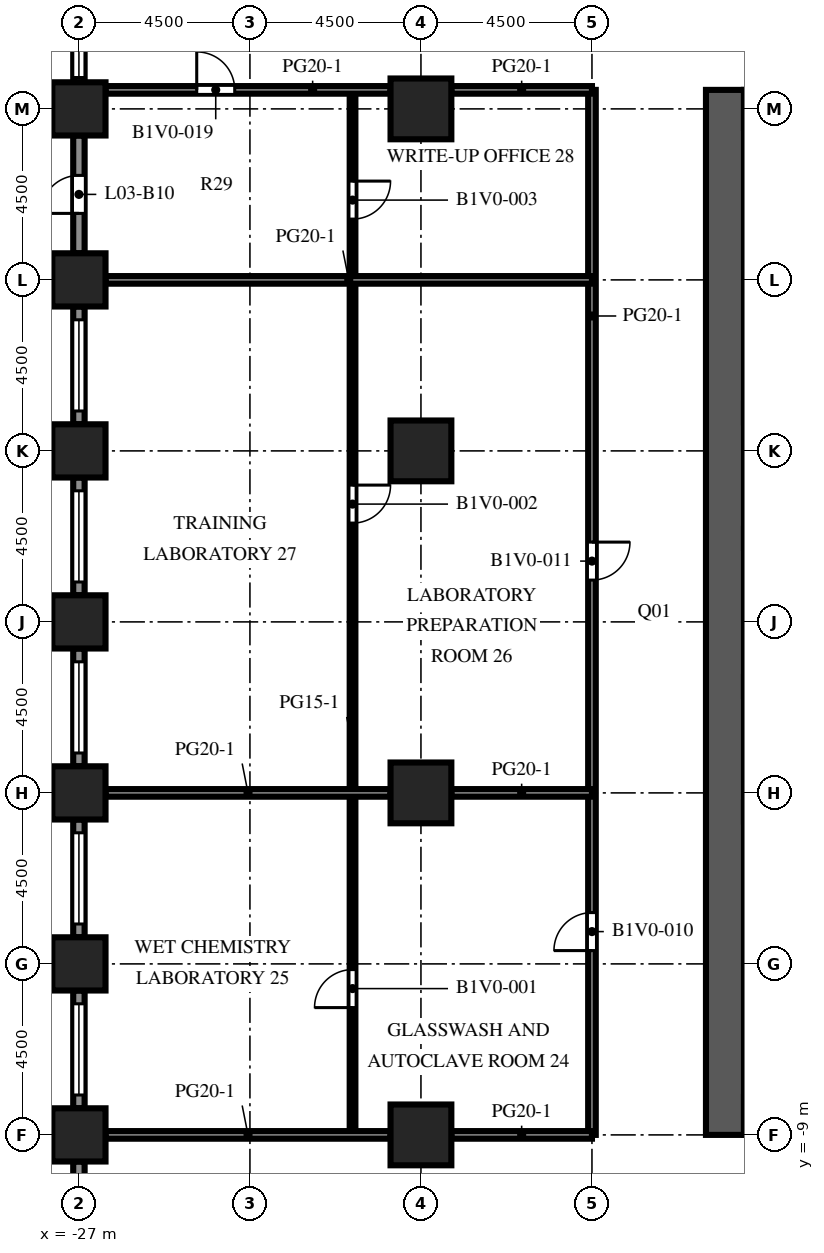
"""IFC4 building model, lengths in metres.
Left out: names, types, materials, properties, quantities, classifications, styles, units other than length and angle.
Written with IfcOpenShell. Run it as: python <this file> out.ifc"""

import sys

from ifc_helpers import new_model, si_unit, direction, frame, frame_2d, origin, origin_2d, place, context, subcontext, project, spatial, rectangle, extrude, element, fill, save


model = new_model("IFC4")
c1 = context("Model", 3, precision=1e-05, world=origin(), true_north=direction((0.0, 1.0)))
c2 = subcontext(c1, "Body", "Model", "MODEL_VIEW")
j1 = project(units=[si_unit("LENGTHUNIT", "METRE"), si_unit("PLANEANGLEUNIT", "RADIAN")], contexts=[c1])
p1 = place(None, origin())
s1 = spatial("IfcSite", under=j1, at=p1, CompositionType="ELEMENT")
p2 = place(p1, origin())
s2 = spatial("IfcBuilding", under=s1, at=p2, CompositionType="ELEMENT")
p3 = place(p2, frame((0.0, 0.0, 15.4)))
s3 = spatial("IfcBuildingStorey", under=s2, at=p3, CompositionType="ELEMENT", Elevation=15.4)
for number, where, z_axis, x_axis in (
    (1, (-27.0, -9.0, 0.0), (0.0, 0.0, 1.0), (1.0, 0.0, 0.0)),
    (2, (-27.0, -4.5, 0.0), (0.0, 0.0, 1.0), (1.0, 0.0, 0.0)),
    (3, (-27.0, 0.0, 0.0), (0.0, 0.0, 1.0), (1.0, 0.0, 0.0)),
    (4, (-27.0, 4.5, 0.0), (0.0, 0.0, 1.0), (1.0, 0.0, 0.0)),
    (5, (-27.0, 9.0, 0.0), (0.0, 0.0, 1.0), (1.0, 0.0, 0.0)),
    (6, (-27.0, 13.5, 0.0), (0.0, 0.0, 1.0), (1.0, 0.0, 0.0)),
    (7, (-27.0, 18.0, 0.0), (0.0, 0.0, 1.0), (1.0, 0.0, 0.0)),
):
    element("IfcColumn", number, at=place(p3, frame(where, z_axis=z_axis, x_axis=x_axis)), inside=s3, PredefinedType="COLUMN", context=c2, shape_type="SweptSolid", body=[
        extrude(rectangle(XDim=1.4, YDim=1.4, at=origin_2d()), origin(), (0.0, 0.0, 1.0), 4.1),
    ])
for number, where, z_axis, x_axis in (
    (8, (-18.0, -9.0, 0.0), (0.0, 0.0, 1.0), (1.0, 0.0, 0.0)),
    (9, (-18.0, 0.0, 0.0), (0.0, 0.0, 1.0), (1.0, 0.0, 0.0)),
    (10, (-18.0, 9.0, 0.0), (0.0, 0.0, 1.0), (1.0, 0.0, 0.0)),
    (11, (-18.0, 18.0, 0.0), (0.0, 0.0, 1.0), (1.0, 0.0, 0.0)),
):
    element("IfcColumn", number, at=place(p3, frame(where, z_axis=z_axis, x_axis=x_axis)), inside=s3, PredefinedType="COLUMN", context=c2, shape_type="SweptSolid", body=[
        extrude(rectangle(XDim=1.6, YDim=1.6, at=origin_2d()), origin(), (0.0, 0.0, 1.0), 4.1),
    ])
p4 = place(p3, frame((-10.0, -9.0, 0.0), z_axis=(0.0, 0.0, 1.0), x_axis=(0.0, 1.0, 0.0)))
e12 = element("IfcWall", 12, at=p4, inside=s3, PredefinedType="SHEAR", context=c2, shape_type="SweptSolid", body=[
    extrude(rectangle(XDim=27.5, YDim=1.0, at=frame_2d((13.75, 0.0))), origin(), (0.0, 0.0, 1.0), 4.1),
])
p5 = place(p4, frame((12.55, 0.0, 0.0)))
e13 = element("IfcOpeningElement", 13, at=p5, cuts=e12, PredefinedType="OPENING", context=c2, shape_type="SweptSolid", body=[
    extrude(rectangle(XDim=2.4, YDim=2.4, at=frame_2d((1.2, 1.2))), frame((0.0, 0.51, 0.0), z_axis=(0.0, -1.0, 0.0), x_axis=(1.0, 0.0, 0.0)), (0.0, 0.0, 1.0), 1.02),
])
p6 = place(p4, frame((6.825, 0.0, 0.0)))
e14 = element("IfcOpeningElement", 14, at=p6, cuts=e12, PredefinedType="OPENING", context=c2, shape_type="SweptSolid", body=[
    extrude(rectangle(XDim=1.2, YDim=2.1, at=frame_2d((0.6, 1.05))), frame((0.0, 0.51, 0.0), z_axis=(0.0, -1.0, 0.0), x_axis=(1.0, 0.0, 0.0)), (0.0, 0.0, 1.0), 1.02),
])
p7 = place(p4, frame((19.475, 0.0, 0.0)))
e15 = element("IfcOpeningElement", 15, at=p7, cuts=e12, PredefinedType="OPENING", context=c2, shape_type="SweptSolid", body=[
    extrude(rectangle(XDim=1.2, YDim=2.1, at=frame_2d((0.6, 1.05))), frame((0.0, 0.51, 0.0), z_axis=(0.0, -1.0, 0.0), x_axis=(1.0, 0.0, 0.0)), (0.0, 0.0, 1.0), 1.02),
])
p8 = place(p3, frame((-27.0, 18.7, 0.0), z_axis=(0.0, 0.0, 1.0), x_axis=(0.0, 1.0, 0.0)))
e16 = element("IfcWall", 16, at=p8, inside=s3, PredefinedType="SOLIDWALL", context=c2, shape_type="SweptSolid", body=[
    extrude(rectangle(XDim=3.1, YDim=0.3, at=frame_2d((1.55, 0.0))), origin(), (0.0, 0.0, 1.0), 2.75),
])
p9 = place(p8, frame((0.125, 0.0, 0.8)))
e17 = element("IfcOpeningElement", 17, at=p9, cuts=e16, PredefinedType="OPENING", context=c2, shape_type="SweptSolid", body=[
    extrude(rectangle(XDim=2.4, YDim=1.7, at=frame_2d((1.2, 0.85))), frame((0.0, 0.16, 0.0), z_axis=(0.0, -1.0, 0.0), x_axis=(1.0, 0.0, 0.0)), (0.0, 0.0, 1.0), 0.32),
])
p10 = place(p3, frame((-27.0, 14.2, 0.0), z_axis=(0.0, 0.0, 1.0), x_axis=(0.0, 1.0, 0.0)))
e18 = element("IfcWall", 18, at=p10, inside=s3, PredefinedType="SOLIDWALL", context=c2, shape_type="SweptSolid", body=[
    extrude(rectangle(XDim=3.1, YDim=0.3, at=frame_2d((1.55, 0.0))), origin(), (0.0, 0.0, 1.0), 2.75),
])
p11 = place(p10, frame((1.05, 0.0, 0.0)))
e19 = element("IfcOpeningElement", 19, at=p11, cuts=e18, PredefinedType="OPENING", context=c2, shape_type="SweptSolid", body=[
    extrude(rectangle(XDim=1.0, YDim=2.2, at=frame_2d((0.5, 1.1))), frame((0.0, 0.16, 0.0), z_axis=(0.0, -1.0, 0.0), x_axis=(1.0, 0.0, 0.0)), (0.0, 0.0, 1.0), 0.32),
])
p12 = place(p3, frame((-27.0, 9.7, 0.0), z_axis=(0.0, 0.0, 1.0), x_axis=(0.0, 1.0, 0.0)))
e20 = element("IfcWall", 20, at=p12, inside=s3, PredefinedType="SOLIDWALL", context=c2, shape_type="SweptSolid", body=[
    extrude(rectangle(XDim=3.1, YDim=0.3, at=frame_2d((1.55, 0.0))), origin(), (0.0, 0.0, 1.0), 2.75),
])
p13 = place(p12, frame((0.35, 0.0, 0.8)))
e21 = element("IfcOpeningElement", 21, at=p13, cuts=e20, PredefinedType="OPENING", context=c2, shape_type="SweptSolid", body=[
    extrude(rectangle(XDim=2.4, YDim=1.7, at=frame_2d((1.2, 0.85))), frame((0.0, 0.16, 0.0), z_axis=(0.0, -1.0, 0.0), x_axis=(1.0, 0.0, 0.0)), (0.0, 0.0, 1.0), 0.32),
])
p14 = place(p3, frame((-27.0, 5.2, 0.0), z_axis=(0.0, 0.0, 1.0), x_axis=(0.0, 1.0, 0.0)))
e22 = element("IfcWall", 22, at=p14, inside=s3, PredefinedType="SOLIDWALL", context=c2, shape_type="SweptSolid", body=[
    extrude(rectangle(XDim=3.1, YDim=0.3, at=frame_2d((1.55, 0.0))), origin(), (0.0, 0.0, 1.0), 2.75),
])
p15 = place(p14, frame((0.35, 0.0, 0.8)))
e23 = element("IfcOpeningElement", 23, at=p15, cuts=e22, PredefinedType="OPENING", context=c2, shape_type="SweptSolid", body=[
    extrude(rectangle(XDim=2.4, YDim=1.7, at=frame_2d((1.2, 0.85))), frame((0.0, 0.16, 0.0), z_axis=(0.0, -1.0, 0.0), x_axis=(1.0, 0.0, 0.0)), (0.0, 0.0, 1.0), 0.32),
])
p16 = place(p3, frame((-27.0, 0.7, 0.0), z_axis=(0.0, 0.0, 1.0), x_axis=(0.0, 1.0, 0.0)))
e24 = element("IfcWall", 24, at=p16, inside=s3, PredefinedType="SOLIDWALL", context=c2, shape_type="SweptSolid", body=[
    extrude(rectangle(XDim=3.1, YDim=0.3, at=frame_2d((1.55, 0.0))), origin(), (0.0, 0.0, 1.0), 2.75),
])
p17 = place(p16, frame((0.35, 0.0, 0.8)))
e25 = element("IfcOpeningElement", 25, at=p17, cuts=e24, PredefinedType="OPENING", context=c2, shape_type="SweptSolid", body=[
    extrude(rectangle(XDim=2.4, YDim=1.7, at=frame_2d((1.2, 0.85))), frame((0.0, 0.16, 0.0), z_axis=(0.0, -1.0, 0.0), x_axis=(1.0, 0.0, 0.0)), (0.0, 0.0, 1.0), 0.32),
])
p18 = place(p3, frame((-27.0, -3.8, 0.0), z_axis=(0.0, 0.0, 1.0), x_axis=(0.0, 1.0, 0.0)))
e26 = element("IfcWall", 26, at=p18, inside=s3, PredefinedType="SOLIDWALL", context=c2, shape_type="SweptSolid", body=[
    extrude(rectangle(XDim=3.1, YDim=0.3, at=frame_2d((1.55, 0.0))), origin(), (0.0, 0.0, 1.0), 2.75),
])
p19 = place(p18, frame((0.35, 0.0, 0.8)))
e27 = element("IfcOpeningElement", 27, at=p19, cuts=e26, PredefinedType="OPENING", context=c2, shape_type="SweptSolid", body=[
    extrude(rectangle(XDim=2.4, YDim=1.7, at=frame_2d((1.2, 0.85))), frame((0.0, 0.16, 0.0), z_axis=(0.0, -1.0, 0.0), x_axis=(1.0, 0.0, 0.0)), (0.0, 0.0, 1.0), 0.32),
])
p20 = place(p3, frame((-27.0, -8.3, 0.0), z_axis=(0.0, 0.0, 1.0), x_axis=(0.0, 1.0, 0.0)))
e28 = element("IfcWall", 28, at=p20, inside=s3, PredefinedType="SOLIDWALL", context=c2, shape_type="SweptSolid", body=[
    extrude(rectangle(XDim=3.1, YDim=0.3, at=frame_2d((1.55, 0.0))), origin(), (0.0, 0.0, 1.0), 2.75),
])
p21 = place(p20, frame((0.35, 0.0, 0.8)))
e29 = element("IfcOpeningElement", 29, at=p21, cuts=e28, PredefinedType="OPENING", context=c2, shape_type="SweptSolid", body=[
    extrude(rectangle(XDim=2.4, YDim=1.7, at=frame_2d((1.2, 0.85))), frame((0.0, 0.16, 0.0), z_axis=(0.0, -1.0, 0.0), x_axis=(1.0, 0.0, 0.0)), (0.0, 0.0, 1.0), 0.32),
])
p22 = place(p3, frame((-27.0, -12.8, 0.0), z_axis=(0.0, 0.0, 1.0), x_axis=(0.0, 1.0, 0.0)))
e30 = element("IfcWall", 30, at=p22, inside=s3, PredefinedType="SOLIDWALL", context=c2, shape_type="SweptSolid", body=[
    extrude(rectangle(XDim=3.1, YDim=0.3, at=frame_2d((1.55, 0.0))), origin(), (0.0, 0.0, 1.0), 2.75),
])
p23 = place(p22, frame((1.425, 0.0, 0.8)))
e31 = element("IfcOpeningElement", 31, at=p23, cuts=e30, PredefinedType="OPENING", context=c2, shape_type="SweptSolid", body=[
    extrude(rectangle(XDim=1.2, YDim=1.7, at=frame_2d((0.6, 0.85))), frame((0.0, 0.16, 0.0), z_axis=(0.0, -1.0, 0.0), x_axis=(1.0, 0.0, 0.0)), (0.0, 0.0, 1.0), 0.32),
])
p24 = place(p3, frame((-19.8, -9.0, 0.0), z_axis=(0.0, 0.0, 1.0), x_axis=(0.0, 1.0, 0.0)))
e32 = element("IfcWall", 32, at=p24, inside=s3, PredefinedType="PARTITIONING", context=c2, shape_type="SweptSolid", body=[
    extrude(rectangle(XDim=27.5, YDim=0.15, at=frame_2d((13.75, 0.0))), origin(), (0.0, 0.0, 1.0), 3.65),
])
p25 = place(p24, frame((3.35, 0.0, 0.0)))
e33 = element("IfcOpeningElement", 33, at=p25, cuts=e32, PredefinedType="OPENING", context=c2, shape_type="SweptSolid", body=[
    extrude(rectangle(XDim=1.0, YDim=2.1, at=frame_2d((0.5, 1.05))), frame((0.0, 0.085, 0.0), z_axis=(0.0, -1.0, 0.0), x_axis=(1.0, 0.0, 0.0)), (0.0, 0.0, 1.0), 0.17),
])
p26 = place(p24, frame((16.1, 0.0, 0.0)))
e34 = element("IfcOpeningElement", 34, at=p26, cuts=e32, PredefinedType="OPENING", context=c2, shape_type="SweptSolid", body=[
    extrude(rectangle(XDim=1.0, YDim=2.1, at=frame_2d((0.5, 1.05))), frame((0.0, 0.085, 0.0), z_axis=(0.0, -1.0, 0.0), x_axis=(1.0, 0.0, 0.0)), (0.0, 0.0, 1.0), 0.17),
])
p27 = place(p24, frame((24.1, 0.0, 0.0)))
e35 = element("IfcOpeningElement", 35, at=p27, cuts=e32, PredefinedType="OPENING", context=c2, shape_type="SweptSolid", body=[
    extrude(rectangle(XDim=1.0, YDim=2.1, at=frame_2d((0.5, 1.05))), frame((0.0, 0.085, 0.0), z_axis=(0.0, -1.0, 0.0), x_axis=(1.0, 0.0, 0.0)), (0.0, 0.0, 1.0), 0.17),
])
p28 = place(p3, frame((-13.5, -9.0, 0.0), z_axis=(0.0, 0.0, 1.0), x_axis=(0.0, 1.0, 0.0)))
e36 = element("IfcWall", 36, at=p28, inside=s3, PredefinedType="PARTITIONING", context=c2, shape_type="SweptSolid", body=[
    extrude(rectangle(XDim=27.5, YDim=0.2, at=frame_2d((13.75, 0.0))), origin(), (0.0, 0.0, 1.0), 3.65),
])
p29 = place(p28, frame((4.85, 0.0, 0.0)))
e37 = element("IfcOpeningElement", 37, at=p29, cuts=e36, PredefinedType="OPENING", context=c2, shape_type="SweptSolid", body=[
    extrude(rectangle(XDim=1.0, YDim=2.1, at=frame_2d((0.5, 1.05))), frame((0.0, 0.11, 0.0), z_axis=(0.0, -1.0, 0.0), x_axis=(1.0, 0.0, 0.0)), (0.0, 0.0, 1.0), 0.22),
])
p30 = place(p28, frame((14.6, 0.0, 0.0)))
e38 = element("IfcOpeningElement", 38, at=p30, cuts=e36, PredefinedType="OPENING", context=c2, shape_type="SweptSolid", body=[
    extrude(rectangle(XDim=1.0, YDim=2.1, at=frame_2d((0.5, 1.05))), frame((0.0, 0.11, 0.0), z_axis=(0.0, -1.0, 0.0), x_axis=(1.0, 0.0, 0.0)), (0.0, 0.0, 1.0), 0.22),
])
p31 = place(p3, frame((-26.3, -9.0, 0.0), z_axis=(0.0, 0.0, 1.0), x_axis=(1.0, 0.0, 0.0)))
e39 = element("IfcWall", 39, at=p31, inside=s3, PredefinedType="PARTITIONING", context=c2, shape_type="SweptSolid", body=[
    extrude(rectangle(XDim=7.5, YDim=0.2, at=frame_2d((3.75, 0.0))), origin(), (0.0, 0.0, 1.0), 3.65),
])
p32 = place(p3, frame((-17.2, -9.0, 0.0), z_axis=(0.0, 0.0, 1.0), x_axis=(1.0, 0.0, 0.0)))
e40 = element("IfcWall", 40, at=p32, inside=s3, PredefinedType="PARTITIONING", context=c2, shape_type="SweptSolid", body=[
    extrude(rectangle(XDim=3.7, YDim=0.2, at=frame_2d((1.85, 0.0))), origin(), (0.0, 0.0, 1.0), 3.65),
])
p33 = place(p3, frame((-26.3, 0.0, 0.0), z_axis=(0.0, 0.0, 1.0), x_axis=(1.0, 0.0, 0.0)))
e41 = element("IfcWall", 41, at=p33, inside=s3, PredefinedType="PARTITIONING", context=c2, shape_type="SweptSolid", body=[
    extrude(rectangle(XDim=7.5, YDim=0.2, at=frame_2d((3.75, 0.0))), origin(), (0.0, 0.0, 1.0), 3.65),
])
p34 = place(p3, frame((-17.2, 0.0, 0.0), z_axis=(0.0, 0.0, 1.0), x_axis=(1.0, 0.0, 0.0)))
e42 = element("IfcWall", 42, at=p34, inside=s3, PredefinedType="PARTITIONING", context=c2, shape_type="SweptSolid", body=[
    extrude(rectangle(XDim=3.7, YDim=0.2, at=frame_2d((1.85, 0.0))), origin(), (0.0, 0.0, 1.0), 3.65),
])
p35 = place(p3, frame((-26.3, 13.5, 0.0), z_axis=(0.0, 0.0, 1.0), x_axis=(1.0, 0.0, 0.0)))
e43 = element("IfcWall", 43, at=p35, inside=s3, PredefinedType="PARTITIONING", context=c2, shape_type="SweptSolid", body=[
    extrude(rectangle(XDim=12.8, YDim=0.2, at=frame_2d((6.4, 0.0))), origin(), (0.0, 0.0, 1.0), 3.65),
])
p36 = place(p3, frame((-18.8, 18.5, 0.0), z_axis=(0.0, 0.0, 1.0), x_axis=(-1.0, 0.0, 0.0)))
e44 = element("IfcWall", 44, at=p36, inside=s3, PredefinedType="PARTITIONING", context=c2, shape_type="SweptSolid", body=[
    extrude(rectangle(XDim=7.5, YDim=0.2, at=frame_2d((3.75, 0.0))), origin(), (0.0, 0.0, 1.0), 3.65),
])
p37 = place(p36, frame((4.1, 0.0, 0.0)))
e45 = element("IfcOpeningElement", 45, at=p37, cuts=e44, PredefinedType="OPENING", context=c2, shape_type="SweptSolid", body=[
    extrude(rectangle(XDim=1.0, YDim=2.1, at=frame_2d((0.5, 1.05))), frame((0.0, 0.11, 0.0), z_axis=(0.0, -1.0, 0.0), x_axis=(1.0, 0.0, 0.0)), (0.0, 0.0, 1.0), 0.22),
])
p38 = place(p3, frame((-17.2, 18.5, 0.0), z_axis=(0.0, 0.0, 1.0), x_axis=(1.0, 0.0, 0.0)))
e46 = element("IfcWall", 46, at=p38, inside=s3, PredefinedType="PARTITIONING", context=c2, shape_type="SweptSolid", body=[
    extrude(rectangle(XDim=3.7, YDim=0.2, at=frame_2d((1.85, 0.0))), origin(), (0.0, 0.0, 1.0), 3.65),
])
p39 = place(p9, origin())
e47 = element("IfcWindow", 47, at=p39, inside=s3, PartitioningType="SINGLE_PANEL", PredefinedType="WINDOW", context=c2, shape_type="SweptSolid", body=[
    extrude(rectangle(XDim=2.4, YDim=1.7, at=frame_2d((1.2, 0.85))), frame((0.0, 0.03, 0.0), z_axis=(0.0, -1.0, 0.0), x_axis=(1.0, 0.0, 0.0)), (0.0, 0.0, 1.0), 0.06),
])
fill(e17, e47)
p40 = place(p11, origin())
e48 = element("IfcDoor", 48, at=p40, inside=s3, OperationType="SINGLE_SWING_LEFT", PredefinedType="DOOR", context=c2, shape_type="SweptSolid", body=[
    extrude(rectangle(XDim=1.0, YDim=2.2, at=frame_2d((0.5, 1.1))), frame((0.0, 0.025, 0.0), z_axis=(0.0, -1.0, 0.0), x_axis=(1.0, 0.0, 0.0)), (0.0, 0.0, 1.0), 0.05),
])
fill(e19, e48)
p41 = place(p13, origin())
e49 = element("IfcWindow", 49, at=p41, inside=s3, PartitioningType="SINGLE_PANEL", PredefinedType="WINDOW", context=c2, shape_type="SweptSolid", body=[
    extrude(rectangle(XDim=2.4, YDim=1.7, at=frame_2d((1.2, 0.85))), frame((0.0, 0.03, 0.0), z_axis=(0.0, -1.0, 0.0), x_axis=(1.0, 0.0, 0.0)), (0.0, 0.0, 1.0), 0.06),
])
fill(e21, e49)
p42 = place(p15, origin())
e50 = element("IfcWindow", 50, at=p42, inside=s3, PartitioningType="SINGLE_PANEL", PredefinedType="WINDOW", context=c2, shape_type="SweptSolid", body=[
    extrude(rectangle(XDim=2.4, YDim=1.7, at=frame_2d((1.2, 0.85))), frame((0.0, 0.03, 0.0), z_axis=(0.0, -1.0, 0.0), x_axis=(1.0, 0.0, 0.0)), (0.0, 0.0, 1.0), 0.06),
])
fill(e23, e50)
p43 = place(p17, origin())
e51 = element("IfcWindow", 51, at=p43, inside=s3, PartitioningType="SINGLE_PANEL", PredefinedType="WINDOW", context=c2, shape_type="SweptSolid", body=[
    extrude(rectangle(XDim=2.4, YDim=1.7, at=frame_2d((1.2, 0.85))), frame((0.0, 0.03, 0.0), z_axis=(0.0, -1.0, 0.0), x_axis=(1.0, 0.0, 0.0)), (0.0, 0.0, 1.0), 0.06),
])
fill(e25, e51)
p44 = place(p19, origin())
e52 = element("IfcWindow", 52, at=p44, inside=s3, PartitioningType="SINGLE_PANEL", PredefinedType="WINDOW", context=c2, shape_type="SweptSolid", body=[
    extrude(rectangle(XDim=2.4, YDim=1.7, at=frame_2d((1.2, 0.85))), frame((0.0, 0.03, 0.0), z_axis=(0.0, -1.0, 0.0), x_axis=(1.0, 0.0, 0.0)), (0.0, 0.0, 1.0), 0.06),
])
fill(e27, e52)
p45 = place(p21, origin())
e53 = element("IfcWindow", 53, at=p45, inside=s3, PartitioningType="SINGLE_PANEL", PredefinedType="WINDOW", context=c2, shape_type="SweptSolid", body=[
    extrude(rectangle(XDim=2.4, YDim=1.7, at=frame_2d((1.2, 0.85))), frame((0.0, 0.03, 0.0), z_axis=(0.0, -1.0, 0.0), x_axis=(1.0, 0.0, 0.0)), (0.0, 0.0, 1.0), 0.06),
])
fill(e29, e53)
p46 = place(p5, origin())
e54 = element("IfcDoor", 54, at=p46, inside=s3, OperationType="DOUBLE_DOOR_DOUBLE_SWING", PredefinedType="DOOR", context=c2, shape_type="SweptSolid", body=[
    extrude(rectangle(XDim=2.4, YDim=2.4, at=frame_2d((1.2, 1.2))), frame((0.0, 0.025, 0.0), z_axis=(0.0, -1.0, 0.0), x_axis=(1.0, 0.0, 0.0)), (0.0, 0.0, 1.0), 0.05),
])
fill(e13, e54)
p47 = place(p6, origin())
e55 = element("IfcDoor", 55, at=p47, inside=s3, OperationType="SINGLE_SWING_LEFT", PredefinedType="DOOR", context=c2, shape_type="SweptSolid", body=[
    extrude(rectangle(XDim=1.2, YDim=2.1, at=frame_2d((0.6, 1.05))), frame((0.0, 0.025, 0.0), z_axis=(0.0, -1.0, 0.0), x_axis=(1.0, 0.0, 0.0)), (0.0, 0.0, 1.0), 0.05),
])
fill(e14, e55)
p48 = place(p7, origin())
e56 = element("IfcDoor", 56, at=p48, inside=s3, OperationType="SINGLE_SWING_LEFT", PredefinedType="DOOR", context=c2, shape_type="SweptSolid", body=[
    extrude(rectangle(XDim=1.2, YDim=2.1, at=frame_2d((0.6, 1.05))), frame((0.0, 0.025, 0.0), z_axis=(0.0, -1.0, 0.0), x_axis=(1.0, 0.0, 0.0)), (0.0, 0.0, 1.0), 0.05),
])
fill(e15, e56)
p49 = place(p25, origin())
e57 = element("IfcDoor", 57, at=p49, inside=s3, OperationType="SINGLE_SWING_LEFT", PredefinedType="DOOR", context=c2, shape_type="SweptSolid", body=[
    extrude(rectangle(XDim=1.0, YDim=2.1, at=frame_2d((0.5, 1.05))), frame((0.0, 0.025, 0.0), z_axis=(0.0, -1.0, 0.0), x_axis=(1.0, 0.0, 0.0)), (0.0, 0.0, 1.0), 0.05),
])
fill(e33, e57)
p50 = place(p26, origin())
e58 = element("IfcDoor", 58, at=p50, inside=s3, OperationType="SINGLE_SWING_RIGHT", PredefinedType="DOOR", context=c2, shape_type="SweptSolid", body=[
    extrude(rectangle(XDim=1.0, YDim=2.1, at=frame_2d((0.5, 1.05))), frame((0.0, 0.025, 0.0), z_axis=(0.0, -1.0, 0.0), x_axis=(1.0, 0.0, 0.0)), (0.0, 0.0, 1.0), 0.05),
])
fill(e34, e58)
p51 = place(p27, origin())
e59 = element("IfcDoor", 59, at=p51, inside=s3, OperationType="SINGLE_SWING_RIGHT", PredefinedType="DOOR", context=c2, shape_type="SweptSolid", body=[
    extrude(rectangle(XDim=1.0, YDim=2.1, at=frame_2d((0.5, 1.05))), frame((0.0, 0.025, 0.0), z_axis=(0.0, -1.0, 0.0), x_axis=(1.0, 0.0, 0.0)), (0.0, 0.0, 1.0), 0.05),
])
fill(e35, e59)
p52 = place(p29, origin())
e60 = element("IfcDoor", 60, at=p52, inside=s3, OperationType="SINGLE_SWING_LEFT", PredefinedType="DOOR", context=c2, shape_type="SweptSolid", body=[
    extrude(rectangle(XDim=1.0, YDim=2.1, at=frame_2d((0.5, 1.05))), frame((0.0, 0.025, 0.0), z_axis=(0.0, -1.0, 0.0), x_axis=(1.0, 0.0, 0.0)), (0.0, 0.0, 1.0), 0.05),
])
fill(e37, e60)
p53 = place(p30, origin())
e61 = element("IfcDoor", 61, at=p53, inside=s3, OperationType="SINGLE_SWING_RIGHT", PredefinedType="DOOR", context=c2, shape_type="SweptSolid", body=[
    extrude(rectangle(XDim=1.0, YDim=2.1, at=frame_2d((0.5, 1.05))), frame((0.0, 0.025, 0.0), z_axis=(0.0, -1.0, 0.0), x_axis=(1.0, 0.0, 0.0)), (0.0, 0.0, 1.0), 0.05),
])
fill(e38, e61)
p54 = place(p37, origin())
e62 = element("IfcDoor", 62, at=p54, inside=s3, OperationType="SINGLE_SWING_RIGHT", PredefinedType="DOOR", context=c2, shape_type="SweptSolid", body=[
    extrude(rectangle(XDim=1.0, YDim=2.1, at=frame_2d((0.5, 1.05))), frame((0.0, 0.025, 0.0), z_axis=(0.0, -1.0, 0.0), x_axis=(1.0, 0.0, 0.0)), (0.0, 0.0, 1.0), 0.05),
])
fill(e45, e62)
save(model, sys.argv[1])
